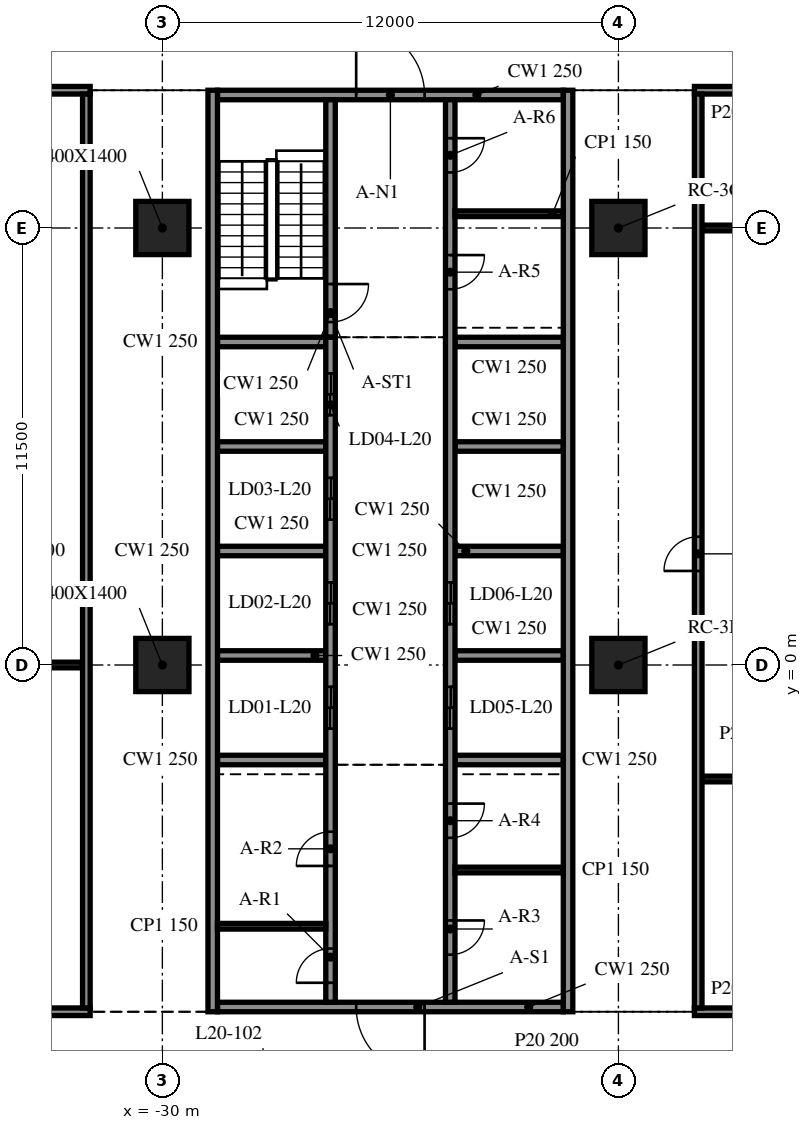
"""IFC4 building model, lengths in metres.
Left out: names, types, materials, properties, quantities, classifications, styles, units other than length and angle.
Written with IfcOpenShell. Run it as: python <this file> out.ifc"""

import sys

from ifc_helpers import new_model, si_unit, direction, frame, frame_2d, origin, origin_2d, place, context, subcontext, project, spatial, rectangle, extrude, element, fill, save


model = new_model("IFC4")
c1 = context("Model", 3, precision=1e-05, world=origin(), true_north=direction((0.0, 1.0)))
c2 = subcontext(c1, "Body", "Model", "MODEL_VIEW")
j1 = project(units=[si_unit("LENGTHUNIT", "METRE"), si_unit("PLANEANGLEUNIT", "RADIAN")], contexts=[c1])
p1 = place(None, origin())
s1 = spatial("IfcSite", under=j1, at=p1, CompositionType="ELEMENT")
p2 = place(p1, origin())
s2 = spatial("IfcBuilding", under=s1, at=p2, CompositionType="ELEMENT")
p3 = place(p2, frame((0.0, 0.0, 88.9)))
s3 = spatial("IfcBuildingStorey", under=s2, at=p3, CompositionType="ELEMENT", Elevation=88.9)
for number, where, z_axis, x_axis in (
    (1, (-30.0, 0.0, -0.34), (0.0, 0.0, 1.0), (1.0, 0.0, 0.0)),
    (2, (-30.0, 11.5, -0.34), (0.0, 0.0, 1.0), (1.0, 0.0, 0.0)),
    (3, (-18.0, 0.0, -0.34), (0.0, 0.0, 1.0), (1.0, 0.0, 0.0)),
    (4, (-18.0, 11.5, -0.34), (0.0, 0.0, 1.0), (1.0, 0.0, 0.0)),
):
    element("IfcColumn", number, at=place(p3, frame(where, z_axis=z_axis, x_axis=x_axis)), inside=s3, PredefinedType="COLUMN", context=c2, shape_type="SweptSolid", body=[
        extrude(rectangle(XDim=1.4, YDim=1.4, at=origin_2d()), origin(), (0.0, 0.0, 1.0), 4.1),
    ])
for number, where, z_axis, x_axis in (
    (5, (-28.675, 15.125, 0.0), (0.0, 0.0, 1.0), (0.0, -1.0, 0.0)),
    (6, (-19.325, -9.125, 0.0), (0.0, 0.0, 1.0), (0.0, 1.0, 0.0)),
):
    element("IfcWall", number, at=place(p3, frame(where, z_axis=z_axis, x_axis=x_axis)), inside=s3, PredefinedType="SOLIDWALL", context=c2, shape_type="SweptSolid", body=[
        extrude(rectangle(XDim=24.25, YDim=0.25, at=frame_2d((12.125, 0.0))), origin(), (0.0, 0.0, 1.0), 3.76),
    ])
p4 = place(p3, frame((-19.45, -9.0, 0.0), z_axis=(0.0, 0.0, 1.0), x_axis=(-1.0, 0.0, 0.0)))
e7 = element("IfcWall", 7, at=p4, inside=s3, PredefinedType="SOLIDWALL", context=c2, shape_type="SweptSolid", body=[
    extrude(rectangle(XDim=9.1, YDim=0.25, at=frame_2d((4.55, 0.0))), origin(), (0.0, 0.0, 1.0), 3.76),
])
p5 = place(p4, frame((3.65, 0.0, 0.0)))
e8 = element("IfcOpeningElement", 8, at=p5, cuts=e7, PredefinedType="OPENING", context=c2, shape_type="SweptSolid", body=[
    extrude(rectangle(XDim=1.8, YDim=2.1, at=frame_2d((0.9, 1.05))), frame((0.0, 0.135, 0.0), z_axis=(0.0, -1.0, 0.0), x_axis=(1.0, 0.0, 0.0)), (0.0, 0.0, 1.0), 0.27),
])
p6 = place(p3, frame((-28.55, 15.0, 0.0), z_axis=(0.0, 0.0, 1.0), x_axis=(1.0, 0.0, 0.0)))
e9 = element("IfcWall", 9, at=p6, inside=s3, PredefinedType="SOLIDWALL", context=c2, shape_type="SweptSolid", body=[
    extrude(rectangle(XDim=9.1, YDim=0.25, at=frame_2d((4.55, 0.0))), origin(), (0.0, 0.0, 1.0), 3.76),
])
p7 = place(p6, frame((3.65, 0.0, 0.0)))
e10 = element("IfcOpeningElement", 10, at=p7, cuts=e9, PredefinedType="OPENING", context=c2, shape_type="SweptSolid", body=[
    extrude(rectangle(XDim=1.8, YDim=2.1, at=frame_2d((0.9, 1.05))), frame((0.0, 0.135, 0.0), z_axis=(0.0, -1.0, 0.0), x_axis=(1.0, 0.0, 0.0)), (0.0, 0.0, 1.0), 0.27),
])
p8 = place(p3, frame((-25.575, -8.875, 0.0), z_axis=(0.0, 0.0, 1.0), x_axis=(0.0, 1.0, 0.0)))
e11 = element("IfcWall", 11, at=p8, inside=s3, PredefinedType="SOLIDWALL", context=c2, shape_type="SweptSolid", body=[
    extrude(rectangle(XDim=17.5, YDim=0.25, at=frame_2d((8.75, 0.0))), origin(), (0.0, 0.0, 1.0), 3.76),
])
p9 = place(p8, frame((7.2, 0.0, 0.0)))
e12 = element("IfcOpeningElement", 12, at=p9, cuts=e11, PredefinedType="OPENING", context=c2, shape_type="SweptSolid", body=[
    extrude(rectangle(XDim=1.1, YDim=2.1, at=frame_2d((0.55, 1.05))), frame((0.0, 0.135, 0.0), z_axis=(0.0, -1.0, 0.0), x_axis=(1.0, 0.0, 0.0)), (0.0, 0.0, 1.0), 0.27),
])
p10 = place(p8, frame((9.95, 0.0, 0.0)))
e13 = element("IfcOpeningElement", 13, at=p10, cuts=e11, PredefinedType="OPENING", context=c2, shape_type="SweptSolid", body=[
    extrude(rectangle(XDim=1.1, YDim=2.1, at=frame_2d((0.55, 1.05))), frame((0.0, 0.135, 0.0), z_axis=(0.0, -1.0, 0.0), x_axis=(1.0, 0.0, 0.0)), (0.0, 0.0, 1.0), 0.27),
])
p11 = place(p8, frame((12.7, 0.0, 0.0)))
e14 = element("IfcOpeningElement", 14, at=p11, cuts=e11, PredefinedType="OPENING", context=c2, shape_type="SweptSolid", body=[
    extrude(rectangle(XDim=1.1, YDim=2.1, at=frame_2d((0.55, 1.05))), frame((0.0, 0.135, 0.0), z_axis=(0.0, -1.0, 0.0), x_axis=(1.0, 0.0, 0.0)), (0.0, 0.0, 1.0), 0.27),
])
p12 = place(p8, frame((15.45, 0.0, 0.0)))
e15 = element("IfcOpeningElement", 15, at=p12, cuts=e11, PredefinedType="OPENING", context=c2, shape_type="SweptSolid", body=[
    extrude(rectangle(XDim=1.1, YDim=2.1, at=frame_2d((0.55, 1.05))), frame((0.0, 0.135, 0.0), z_axis=(0.0, -1.0, 0.0), x_axis=(1.0, 0.0, 0.0)), (0.0, 0.0, 1.0), 0.27),
])
p13 = place(p8, frame((0.512, 0.0, 0.0)))
e16 = element("IfcOpeningElement", 16, at=p13, cuts=e11, PredefinedType="OPENING", context=c2, shape_type="SweptSolid", body=[
    extrude(rectangle(XDim=0.9, YDim=2.1, at=frame_2d((0.45, 1.05))), frame((0.0, 0.135, 0.0), z_axis=(0.0, -1.0, 0.0), x_axis=(1.0, 0.0, 0.0)), (0.0, 0.0, 1.0), 0.27),
])
p14 = place(p8, frame((3.587, 0.0, 0.0)))
e17 = element("IfcOpeningElement", 17, at=p14, cuts=e11, PredefinedType="OPENING", context=c2, shape_type="SweptSolid", body=[
    extrude(rectangle(XDim=0.9, YDim=2.1, at=frame_2d((0.45, 1.05))), frame((0.0, 0.135, 0.0), z_axis=(0.0, -1.0, 0.0), x_axis=(1.0, 0.0, 0.0)), (0.0, 0.0, 1.0), 0.27),
])
p15 = place(p3, frame((-25.575, 14.875, 0.0), z_axis=(0.0, 0.0, 1.0), x_axis=(0.0, -1.0, 0.0)))
e18 = element("IfcWall", 18, at=p15, inside=s3, PredefinedType="SOLIDWALL", context=c2, shape_type="SweptSolid", body=[
    extrude(rectangle(XDim=6.25, YDim=0.25, at=frame_2d((3.125, 0.0))), origin(), (0.0, 0.0, 1.0), 3.76),
])
p16 = place(p15, frame((4.85, 0.0, 0.0)))
e19 = element("IfcOpeningElement", 19, at=p16, cuts=e18, PredefinedType="OPENING", context=c2, shape_type="SweptSolid", body=[
    extrude(rectangle(XDim=1.0, YDim=2.1, at=frame_2d((0.5, 1.05))), frame((0.0, 0.135, 0.0), z_axis=(0.0, -1.0, 0.0), x_axis=(1.0, 0.0, 0.0)), (0.0, 0.0, 1.0), 0.27),
])
p17 = place(p3, frame((-22.425, 14.875, 0.0), z_axis=(0.0, 0.0, 1.0), x_axis=(0.0, -1.0, 0.0)))
e20 = element("IfcWall", 20, at=p17, inside=s3, PredefinedType="SOLIDWALL", context=c2, shape_type="SweptSolid", body=[
    extrude(rectangle(XDim=23.75, YDim=0.25, at=frame_2d((11.875, 0.0))), origin(), (0.0, 0.0, 1.0), 3.76),
])
p18 = place(p17, frame((15.45, 0.0, 0.0)))
e21 = element("IfcOpeningElement", 21, at=p18, cuts=e20, PredefinedType="OPENING", context=c2, shape_type="SweptSolid", body=[
    extrude(rectangle(XDim=1.1, YDim=2.1, at=frame_2d((0.55, 1.05))), frame((0.0, 0.135, 0.0), z_axis=(0.0, -1.0, 0.0), x_axis=(1.0, 0.0, 0.0)), (0.0, 0.0, 1.0), 0.27),
])
p19 = place(p17, frame((12.7, 0.0, 0.0)))
e22 = element("IfcOpeningElement", 22, at=p19, cuts=e20, PredefinedType="OPENING", context=c2, shape_type="SweptSolid", body=[
    extrude(rectangle(XDim=1.1, YDim=2.1, at=frame_2d((0.55, 1.05))), frame((0.0, 0.135, 0.0), z_axis=(0.0, -1.0, 0.0), x_axis=(1.0, 0.0, 0.0)), (0.0, 0.0, 1.0), 0.27),
])
p20 = place(p17, frame((21.597, 0.0, 0.0)))
e23 = element("IfcOpeningElement", 23, at=p20, cuts=e20, PredefinedType="OPENING", context=c2, shape_type="SweptSolid", body=[
    extrude(rectangle(XDim=0.9, YDim=2.1, at=frame_2d((0.45, 1.05))), frame((0.0, 0.135, 0.0), z_axis=(0.0, -1.0, 0.0), x_axis=(1.0, 0.0, 0.0)), (0.0, 0.0, 1.0), 0.27),
])
p21 = place(p17, frame((18.522, 0.0, 0.0)))
e24 = element("IfcOpeningElement", 24, at=p21, cuts=e20, PredefinedType="OPENING", context=c2, shape_type="SweptSolid", body=[
    extrude(rectangle(XDim=0.9, YDim=2.1, at=frame_2d((0.45, 1.05))), frame((0.0, 0.135, 0.0), z_axis=(0.0, -1.0, 0.0), x_axis=(1.0, 0.0, 0.0)), (0.0, 0.0, 1.0), 0.27),
])
p22 = place(p17, frame((4.087, 0.0, 0.0)))
e25 = element("IfcOpeningElement", 25, at=p22, cuts=e20, PredefinedType="OPENING", context=c2, shape_type="SweptSolid", body=[
    extrude(rectangle(XDim=0.9, YDim=2.1, at=frame_2d((0.45, 1.05))), frame((0.0, 0.135, 0.0), z_axis=(0.0, -1.0, 0.0), x_axis=(1.0, 0.0, 0.0)), (0.0, 0.0, 1.0), 0.27),
])
p23 = place(p17, frame((1.012, 0.0, 0.0)))
e26 = element("IfcOpeningElement", 26, at=p23, cuts=e20, PredefinedType="OPENING", context=c2, shape_type="SweptSolid", body=[
    extrude(rectangle(XDim=0.9, YDim=2.1, at=frame_2d((0.45, 1.05))), frame((0.0, 0.135, 0.0), z_axis=(0.0, -1.0, 0.0), x_axis=(1.0, 0.0, 0.0)), (0.0, 0.0, 1.0), 0.27),
])
for number, where, z_axis, x_axis in (
    (27, (-28.55, -2.5, 0.0), (0.0, 0.0, 1.0), (1.0, 0.0, 0.0)),
    (28, (-28.55, 0.25, 0.0), (0.0, 0.0, 1.0), (1.0, 0.0, 0.0)),
    (29, (-28.55, 3.0, 0.0), (0.0, 0.0, 1.0), (1.0, 0.0, 0.0)),
    (30, (-28.55, 5.75, 0.0), (0.0, 0.0, 1.0), (1.0, 0.0, 0.0)),
    (31, (-28.55, 8.5, 0.0), (0.0, 0.0, 1.0), (1.0, 0.0, 0.0)),
    (32, (-22.3, -2.5, 0.0), (0.0, 0.0, 1.0), (1.0, 0.0, 0.0)),
    (33, (-22.3, 0.25, 0.0), (0.0, 0.0, 1.0), (1.0, 0.0, 0.0)),
    (34, (-22.3, 3.0, 0.0), (0.0, 0.0, 1.0), (1.0, 0.0, 0.0)),
    (35, (-22.3, 5.75, 0.0), (0.0, 0.0, 1.0), (1.0, 0.0, 0.0)),
    (36, (-22.3, 8.5, 0.0), (0.0, 0.0, 1.0), (1.0, 0.0, 0.0)),
):
    element("IfcWall", number, at=place(p3, frame(where, z_axis=z_axis, x_axis=x_axis)), inside=s3, PredefinedType="SOLIDWALL", context=c2, shape_type="SweptSolid", body=[
        extrude(rectangle(XDim=2.85, YDim=0.25, at=frame_2d((1.425, 0.0))), origin(), (0.0, 0.0, 1.0), 3.76),
    ])
for number, where, z_axis, x_axis in (
    (37, (-28.55, -6.875, 0.0), (0.0, 0.0, 1.0), (1.0, 0.0, 0.0)),
    (38, (-22.3, -5.395, 0.0), (0.0, 0.0, 1.0), (1.0, 0.0, 0.0)),
    (39, (-22.3, 11.875, 0.0), (0.0, 0.0, 1.0), (1.0, 0.0, 0.0)),
):
    element("IfcWall", number, at=place(p3, frame(where, z_axis=z_axis, x_axis=x_axis)), inside=s3, PredefinedType="PARTITIONING", context=c2, shape_type="SweptSolid", body=[
        extrude(rectangle(XDim=2.85, YDim=0.15, at=frame_2d((1.425, 0.0))), origin(), (0.0, 0.0, 1.0), 3.76),
    ])
p24 = place(p3, frame((-39.95, -9.125, 0.0), z_axis=(0.0, 0.0, 1.0), x_axis=(1.0, 0.0, 0.0)))
e40 = element("IfcWall", 40, at=p24, inside=s3, PredefinedType="PARTITIONING", context=c2, shape_type="SweptSolid", body=[
    extrude(rectangle(XDim=8.05, YDim=0.2, at=frame_2d((4.025, 0.0))), origin(), (0.0, 0.0, 1.0), 3.76),
])
p25 = place(p24, frame((3.5, 0.0, 0.0)))
e41 = element("IfcOpeningElement", 41, at=p25, cuts=e40, PredefinedType="OPENING", context=c2, shape_type="SweptSolid", body=[
    extrude(rectangle(XDim=1.2, YDim=2.1, at=frame_2d((0.6, 1.05))), frame((0.0, 0.11, 0.0), z_axis=(0.0, -1.0, 0.0), x_axis=(1.0, 0.0, 0.0)), (0.0, 0.0, 1.0), 0.22),
])
p26 = place(p3, frame((-16.0, -9.125, 0.0), z_axis=(0.0, 0.0, 1.0), x_axis=(1.0, 0.0, 0.0)))
e42 = element("IfcWall", 42, at=p26, inside=s3, PredefinedType="PARTITIONING", context=c2, shape_type="SweptSolid", body=[
    extrude(rectangle(XDim=7.9, YDim=0.2, at=frame_2d((3.95, 0.0))), origin(), (0.0, 0.0, 1.0), 3.76),
])
p27 = place(p26, frame((3.5, 0.0, 0.0)))
e43 = element("IfcOpeningElement", 43, at=p27, cuts=e42, PredefinedType="OPENING", context=c2, shape_type="SweptSolid", body=[
    extrude(rectangle(XDim=1.0, YDim=2.1, at=frame_2d((0.5, 1.05))), frame((0.0, 0.11, 0.0), z_axis=(0.0, -1.0, 0.0), x_axis=(1.0, 0.0, 0.0)), (0.0, 0.0, 1.0), 0.22),
])
p28 = place(p3, frame((-15.8, -3.0, 0.0), z_axis=(0.0, 0.0, 1.0), x_axis=(1.0, 0.0, 0.0)))
e44 = element("IfcWall", 44, at=p28, inside=s3, PredefinedType="PARTITIONING", context=c2, shape_type="SweptSolid", body=[
    extrude(rectangle(XDim=7.5, YDim=0.15, at=frame_2d((3.75, 0.0))), origin(), (0.0, 0.0, 1.0), 3.76),
])
p29 = place(p3, frame((-39.75, 0.0, 0.0), z_axis=(0.0, 0.0, 1.0), x_axis=(1.0, 0.0, 0.0)))
e45 = element("IfcWall", 45, at=p29, inside=s3, PredefinedType="PARTITIONING", context=c2, shape_type="SweptSolid", body=[
    extrude(rectangle(XDim=7.65, YDim=0.15, at=frame_2d((3.825, 0.0))), origin(), (0.0, 0.0, 1.0), 3.76),
])
p30 = place(p3, frame((-15.8, 11.5, 0.0), z_axis=(0.0, 0.0, 1.0), x_axis=(1.0, 0.0, 0.0)))
e46 = element("IfcWall", 46, at=p30, inside=s3, PredefinedType="PARTITIONING", context=c2, shape_type="SweptSolid", body=[
    extrude(rectangle(XDim=7.5, YDim=0.15, at=frame_2d((3.75, 0.0))), origin(), (0.0, 0.0, 1.0), 3.76),
])
p31 = place(p3, frame((-39.95, 15.125, 0.0), z_axis=(0.0, 0.0, 1.0), x_axis=(1.0, 0.0, 0.0)))
e47 = element("IfcWall", 47, at=p31, inside=s3, PredefinedType="PARTITIONING", context=c2, shape_type="SweptSolid", body=[
    extrude(rectangle(XDim=8.05, YDim=0.2, at=frame_2d((4.025, 0.0))), origin(), (0.0, 0.0, 1.0), 3.76),
])
p32 = place(p31, frame((3.5, 0.0, 0.0)))
e48 = element("IfcOpeningElement", 48, at=p32, cuts=e47, PredefinedType="OPENING", context=c2, shape_type="SweptSolid", body=[
    extrude(rectangle(XDim=1.0, YDim=2.1, at=frame_2d((0.5, 1.05))), frame((0.0, 0.11, 0.0), z_axis=(0.0, -1.0, 0.0), x_axis=(1.0, 0.0, 0.0)), (0.0, 0.0, 1.0), 0.22),
])
p33 = place(p3, frame((-16.0, 15.125, 0.0), z_axis=(0.0, 0.0, 1.0), x_axis=(1.0, 0.0, 0.0)))
e49 = element("IfcWall", 49, at=p33, inside=s3, PredefinedType="PARTITIONING", context=c2, shape_type="SweptSolid", body=[
    extrude(rectangle(XDim=7.9, YDim=0.2, at=frame_2d((3.95, 0.0))), origin(), (0.0, 0.0, 1.0), 3.76),
])
p34 = place(p33, frame((3.5, 0.0, 0.0)))
e50 = element("IfcOpeningElement", 50, at=p34, cuts=e49, PredefinedType="OPENING", context=c2, shape_type="SweptSolid", body=[
    extrude(rectangle(XDim=1.0, YDim=2.1, at=frame_2d((0.5, 1.05))), frame((0.0, 0.11, 0.0), z_axis=(0.0, -1.0, 0.0), x_axis=(1.0, 0.0, 0.0)), (0.0, 0.0, 1.0), 0.22),
])
p35 = place(p3, frame((-32.0, -9.025, 0.0), z_axis=(0.0, 0.0, 1.0), x_axis=(0.0, 1.0, 0.0)))
e51 = element("IfcWall", 51, at=p35, inside=s3, PredefinedType="PARTITIONING", context=c2, shape_type="SweptSolid", body=[
    extrude(rectangle(XDim=24.05, YDim=0.2, at=frame_2d((12.025, 0.0))), origin(), (0.0, 0.0, 1.0), 3.76),
])
p36 = place(p3, frame((-15.9, -9.025, 0.0), z_axis=(0.0, 0.0, 1.0), x_axis=(0.0, 1.0, 0.0)))
e52 = element("IfcWall", 52, at=p36, inside=s3, PredefinedType="PARTITIONING", context=c2, shape_type="SweptSolid", body=[
    extrude(rectangle(XDim=24.05, YDim=0.2, at=frame_2d((12.025, 0.0))), origin(), (0.0, 0.0, 1.0), 3.76),
])
p37 = place(p36, frame((11.5, 0.0, 0.0)))
e53 = element("IfcOpeningElement", 53, at=p37, cuts=e52, PredefinedType="OPENING", context=c2, shape_type="SweptSolid", body=[
    extrude(rectangle(XDim=0.9, YDim=2.1, at=frame_2d((0.45, 1.05))), frame((0.0, 0.11, 0.0), z_axis=(0.0, -1.0, 0.0), x_axis=(1.0, 0.0, 0.0)), (0.0, 0.0, 1.0), 0.22),
])
p38 = place(p5, origin())
e54 = element("IfcDoor", 54, at=p38, inside=s3, OperationType="DOUBLE_DOOR_SINGLE_SWING", PredefinedType="DOOR", context=c2, shape_type="SweptSolid", body=[
    extrude(rectangle(XDim=1.8, YDim=2.1, at=frame_2d((0.9, 1.05))), frame((0.0, 0.025, 0.0), z_axis=(0.0, -1.0, 0.0), x_axis=(1.0, 0.0, 0.0)), (0.0, 0.0, 1.0), 0.05),
])
fill(e8, e54)
p39 = place(p7, origin())
e55 = element("IfcDoor", 55, at=p39, inside=s3, OperationType="DOUBLE_DOOR_SINGLE_SWING", PredefinedType="DOOR", context=c2, shape_type="SweptSolid", body=[
    extrude(rectangle(XDim=1.8, YDim=2.1, at=frame_2d((0.9, 1.05))), frame((0.0, 0.025, 0.0), z_axis=(0.0, -1.0, 0.0), x_axis=(1.0, 0.0, 0.0)), (0.0, 0.0, 1.0), 0.05),
])
fill(e10, e55)
p40 = place(p18, origin())
e56 = element("IfcDoor", 56, at=p40, inside=s3, OperationType="DOUBLE_DOOR_SLIDING", PredefinedType="DOOR", context=c2, shape_type="SweptSolid", body=[
    extrude(rectangle(XDim=1.1, YDim=2.1, at=frame_2d((0.55, 1.05))), frame((0.0, 0.025, 0.0), z_axis=(0.0, -1.0, 0.0), x_axis=(1.0, 0.0, 0.0)), (0.0, 0.0, 1.0), 0.05),
])
fill(e21, e56)
p41 = place(p19, origin())
e57 = element("IfcDoor", 57, at=p41, inside=s3, OperationType="DOUBLE_DOOR_SLIDING", PredefinedType="DOOR", context=c2, shape_type="SweptSolid", body=[
    extrude(rectangle(XDim=1.1, YDim=2.1, at=frame_2d((0.55, 1.05))), frame((0.0, 0.025, 0.0), z_axis=(0.0, -1.0, 0.0), x_axis=(1.0, 0.0, 0.0)), (0.0, 0.0, 1.0), 0.05),
])
fill(e22, e57)
p42 = place(p9, origin())
e58 = element("IfcDoor", 58, at=p42, inside=s3, OperationType="DOUBLE_DOOR_SLIDING", PredefinedType="DOOR", context=c2, shape_type="SweptSolid", body=[
    extrude(rectangle(XDim=1.1, YDim=2.1, at=frame_2d((0.55, 1.05))), frame((0.0, 0.025, 0.0), z_axis=(0.0, -1.0, 0.0), x_axis=(1.0, 0.0, 0.0)), (0.0, 0.0, 1.0), 0.05),
])
fill(e12, e58)
p43 = place(p10, origin())
e59 = element("IfcDoor", 59, at=p43, inside=s3, OperationType="DOUBLE_DOOR_SLIDING", PredefinedType="DOOR", context=c2, shape_type="SweptSolid", body=[
    extrude(rectangle(XDim=1.1, YDim=2.1, at=frame_2d((0.55, 1.05))), frame((0.0, 0.025, 0.0), z_axis=(0.0, -1.0, 0.0), x_axis=(1.0, 0.0, 0.0)), (0.0, 0.0, 1.0), 0.05),
])
fill(e13, e59)
p44 = place(p11, origin())
e60 = element("IfcDoor", 60, at=p44, inside=s3, OperationType="DOUBLE_DOOR_SLIDING", PredefinedType="DOOR", context=c2, shape_type="SweptSolid", body=[
    extrude(rectangle(XDim=1.1, YDim=2.1, at=frame_2d((0.55, 1.05))), frame((0.0, 0.025, 0.0), z_axis=(0.0, -1.0, 0.0), x_axis=(1.0, 0.0, 0.0)), (0.0, 0.0, 1.0), 0.05),
])
fill(e14, e60)
p45 = place(p12, origin())
e61 = element("IfcDoor", 61, at=p45, inside=s3, OperationType="DOUBLE_DOOR_SLIDING", PredefinedType="DOOR", context=c2, shape_type="SweptSolid", body=[
    extrude(rectangle(XDim=1.1, YDim=2.1, at=frame_2d((0.55, 1.05))), frame((0.0, 0.025, 0.0), z_axis=(0.0, -1.0, 0.0), x_axis=(1.0, 0.0, 0.0)), (0.0, 0.0, 1.0), 0.05),
])
fill(e15, e61)
p46 = place(p13, origin())
e62 = element("IfcDoor", 62, at=p46, inside=s3, OperationType="SINGLE_SWING_LEFT", PredefinedType="DOOR", context=c2, shape_type="SweptSolid", body=[
    extrude(rectangle(XDim=0.9, YDim=2.1, at=frame_2d((0.45, 1.05))), frame((0.0, 0.025, 0.0), z_axis=(0.0, -1.0, 0.0), x_axis=(1.0, 0.0, 0.0)), (0.0, 0.0, 1.0), 0.05),
])
fill(e16, e62)
p47 = place(p14, origin())
e63 = element("IfcDoor", 63, at=p47, inside=s3, OperationType="SINGLE_SWING_RIGHT", PredefinedType="DOOR", context=c2, shape_type="SweptSolid", body=[
    extrude(rectangle(XDim=0.9, YDim=2.1, at=frame_2d((0.45, 1.05))), frame((0.0, 0.025, 0.0), z_axis=(0.0, -1.0, 0.0), x_axis=(1.0, 0.0, 0.0)), (0.0, 0.0, 1.0), 0.05),
])
fill(e17, e63)
p48 = place(p20, origin())
e64 = element("IfcDoor", 64, at=p48, inside=s3, OperationType="SINGLE_SWING_LEFT", PredefinedType="DOOR", context=c2, shape_type="SweptSolid", body=[
    extrude(rectangle(XDim=0.9, YDim=2.1, at=frame_2d((0.45, 1.05))), frame((0.0, 0.025, 0.0), z_axis=(0.0, -1.0, 0.0), x_axis=(1.0, 0.0, 0.0)), (0.0, 0.0, 1.0), 0.05),
])
fill(e23, e64)
p49 = place(p21, origin())
e65 = element("IfcDoor", 65, at=p49, inside=s3, OperationType="SINGLE_SWING_RIGHT", PredefinedType="DOOR", context=c2, shape_type="SweptSolid", body=[
    extrude(rectangle(XDim=0.9, YDim=2.1, at=frame_2d((0.45, 1.05))), frame((0.0, 0.025, 0.0), z_axis=(0.0, -1.0, 0.0), x_axis=(1.0, 0.0, 0.0)), (0.0, 0.0, 1.0), 0.05),
])
fill(e24, e65)
p50 = place(p22, origin())
e66 = element("IfcDoor", 66, at=p50, inside=s3, OperationType="SINGLE_SWING_LEFT", PredefinedType="DOOR", context=c2, shape_type="SweptSolid", body=[
    extrude(rectangle(XDim=0.9, YDim=2.1, at=frame_2d((0.45, 1.05))), frame((0.0, 0.025, 0.0), z_axis=(0.0, -1.0, 0.0), x_axis=(1.0, 0.0, 0.0)), (0.0, 0.0, 1.0), 0.05),
])
fill(e25, e66)
p51 = place(p23, origin())
e67 = element("IfcDoor", 67, at=p51, inside=s3, OperationType="SINGLE_SWING_RIGHT", PredefinedType="DOOR", context=c2, shape_type="SweptSolid", body=[
    extrude(rectangle(XDim=0.9, YDim=2.1, at=frame_2d((0.45, 1.05))), frame((0.0, 0.025, 0.0), z_axis=(0.0, -1.0, 0.0), x_axis=(1.0, 0.0, 0.0)), (0.0, 0.0, 1.0), 0.05),
])
fill(e26, e67)
p52 = place(p16, origin())
e68 = element("IfcDoor", 68, at=p52, inside=s3, OperationType="SINGLE_SWING_LEFT", PredefinedType="DOOR", context=c2, shape_type="SweptSolid", body=[
    extrude(rectangle(XDim=1.0, YDim=2.1, at=frame_2d((0.5, 1.05))), frame((0.0, 0.025, 0.0), z_axis=(0.0, -1.0, 0.0), x_axis=(1.0, 0.0, 0.0)), (0.0, 0.0, 1.0), 0.05),
])
fill(e19, e68)
p53 = place(p37, origin())
e69 = element("IfcDoor", 69, at=p53, inside=s3, OperationType="SINGLE_SWING_RIGHT", PredefinedType="DOOR", context=c2, shape_type="SweptSolid", body=[
    extrude(rectangle(XDim=0.9, YDim=2.1, at=frame_2d((0.45, 1.05))), frame((0.0, 0.025, 0.0), z_axis=(0.0, -1.0, 0.0), x_axis=(1.0, 0.0, 0.0)), (0.0, 0.0, 1.0), 0.05),
])
fill(e53, e69)
save(model, sys.argv[1])
